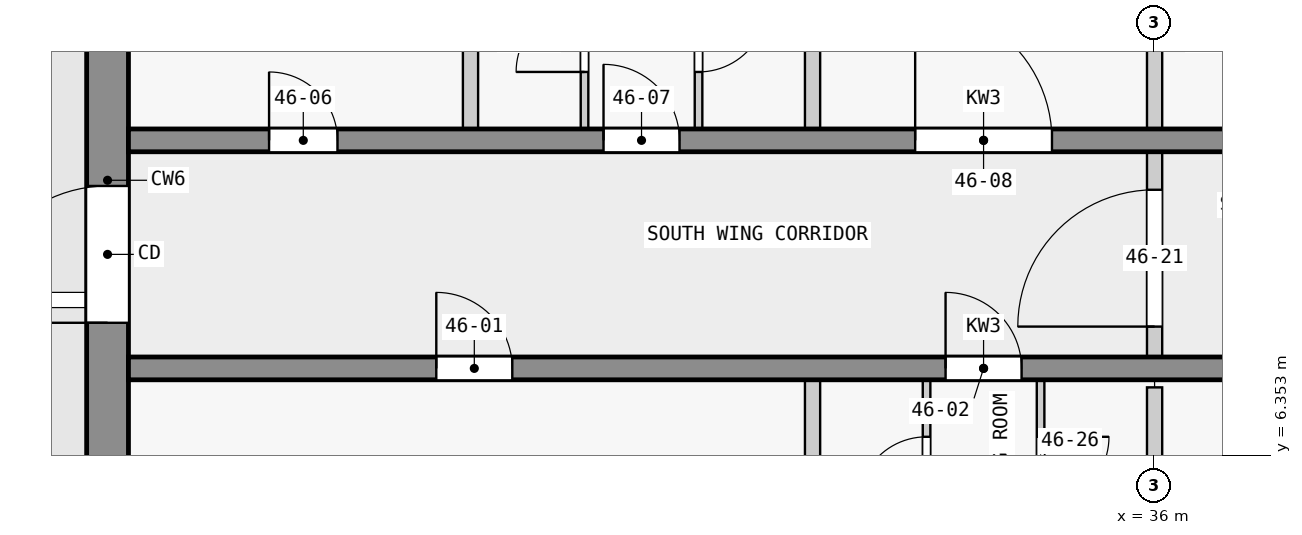
"""IFC4 building model, lengths in metres.
Left out: names, types, materials, properties, quantities, classifications, styles, units other than length and angle.
Written with IfcOpenShell. Run it as: python <this file> out.ifc"""

import sys

from ifc_helpers import new_model, si_unit, direction, frame, frame_2d, origin, place, context, subcontext, project, spatial, rectangle, extrude, element, fill, save


model = new_model("IFC4")
c1 = context("Model", 3, precision=1e-05, world=origin(), true_north=direction((0.0, 1.0)))
c2 = subcontext(c1, "Body", "Model", "MODEL_VIEW")
j1 = project(units=[si_unit("LENGTHUNIT", "METRE"), si_unit("PLANEANGLEUNIT", "RADIAN")], contexts=[c1])
p1 = place(None, origin())
s1 = spatial("IfcSite", under=j1, at=p1, CompositionType="ELEMENT")
p2 = place(p1, origin())
s2 = spatial("IfcBuilding", under=s1, at=p2, CompositionType="ELEMENT")
p3 = place(p2, frame((0.0, 0.0, 177.9)))
s3 = spatial("IfcBuildingStorey", under=s2, at=p3, CompositionType="ELEMENT", Elevation=177.9)
p4 = place(p3, frame((22.225, 2.5, 0.0), z_axis=(0.0, 0.0, 1.0), x_axis=(0.0, 1.0, 0.0)))
e1 = element("IfcWall", 1, at=p4, inside=s3, PredefinedType="SHEAR", context=c2, shape_type="SweptSolid", body=[
    extrude(rectangle(XDim=14.95, YDim=0.55, at=frame_2d((7.475, 0.0))), origin(), (0.0, 0.0, 1.0), 3.25),
])
p5 = place(p4, frame((5.6, 0.0, 0.0)))
e2 = element("IfcOpeningElement", 2, at=p5, cuts=e1, PredefinedType="OPENING", context=c2, shape_type="SweptSolid", body=[
    extrude(rectangle(XDim=1.8, YDim=2.1, at=frame_2d((0.9, 1.05))), frame((0.0, 0.285, 0.0), z_axis=(0.0, -1.0, 0.0), x_axis=(1.0, 0.0, 0.0)), (0.0, 0.0, 1.0), 0.57),
])
p6 = place(p3, frame((22.5, 7.5, 0.0), z_axis=(0.0, 0.0, 1.0), x_axis=(1.0, 0.0, 0.0)))
e3 = element("IfcWall", 3, at=p6, inside=s3, PredefinedType="SHEAR", context=c2, shape_type="SweptSolid", body=[
    extrude(rectangle(XDim=22.5, YDim=0.3, at=frame_2d((11.25, 0.0))), origin(), (0.0, 0.0, 1.0), 3.25),
])
p7 = place(p6, frame((4.05, 0.0, 0.0)))
e4 = element("IfcOpeningElement", 4, at=p7, cuts=e3, PredefinedType="OPENING", context=c2, shape_type="SweptSolid", body=[
    extrude(rectangle(XDim=1.0, YDim=2.1, at=frame_2d((0.5, 1.05))), frame((0.0, 0.16, 0.0), z_axis=(0.0, -1.0, 0.0), x_axis=(1.0, 0.0, 0.0)), (0.0, 0.0, 1.0), 0.32),
])
p8 = place(p6, frame((10.75, 0.0, 0.0)))
e5 = element("IfcOpeningElement", 5, at=p8, cuts=e3, PredefinedType="OPENING", context=c2, shape_type="SweptSolid", body=[
    extrude(rectangle(XDim=1.0, YDim=2.1, at=frame_2d((0.5, 1.05))), frame((0.0, 0.16, 0.0), z_axis=(0.0, -1.0, 0.0), x_axis=(1.0, 0.0, 0.0)), (0.0, 0.0, 1.0), 0.32),
])
p9 = place(p6, frame((15.35, 0.0, 0.0)))
e6 = element("IfcOpeningElement", 6, at=p9, cuts=e3, PredefinedType="OPENING", context=c2, shape_type="SweptSolid", body=[
    extrude(rectangle(XDim=0.9, YDim=2.1, at=frame_2d((0.45, 1.05))), frame((0.0, 0.16, 0.0), z_axis=(0.0, -1.0, 0.0), x_axis=(1.0, 0.0, 0.0)), (0.0, 0.0, 1.0), 0.32),
])
p10 = place(p6, frame((18.75, 0.0, 0.0)))
e7 = element("IfcOpeningElement", 7, at=p10, cuts=e3, PredefinedType="OPENING", context=c2, shape_type="SweptSolid", body=[
    extrude(rectangle(XDim=0.9, YDim=2.1, at=frame_2d((0.45, 1.05))), frame((0.0, 0.16, 0.0), z_axis=(0.0, -1.0, 0.0), x_axis=(1.0, 0.0, 0.0)), (0.0, 0.0, 1.0), 0.32),
])
p11 = place(p6, frame((20.95, 0.0, 0.0)))
e8 = element("IfcOpeningElement", 8, at=p11, cuts=e3, PredefinedType="OPENING", context=c2, shape_type="SweptSolid", body=[
    extrude(rectangle(XDim=1.0, YDim=2.1, at=frame_2d((0.5, 1.05))), frame((0.0, 0.16, 0.0), z_axis=(0.0, -1.0, 0.0), x_axis=(1.0, 0.0, 0.0)), (0.0, 0.0, 1.0), 0.32),
])
p12 = place(p3, frame((22.5, 10.5, 0.0), z_axis=(0.0, 0.0, 1.0), x_axis=(1.0, 0.0, 0.0)))
e9 = element("IfcWall", 9, at=p12, inside=s3, PredefinedType="SHEAR", context=c2, shape_type="SweptSolid", body=[
    extrude(rectangle(XDim=22.5, YDim=0.3, at=frame_2d((11.25, 0.0))), origin(), (0.0, 0.0, 1.0), 3.25),
])
p13 = place(p12, frame((1.85, 0.0, 0.0)))
e10 = element("IfcOpeningElement", 10, at=p13, cuts=e9, PredefinedType="OPENING", context=c2, shape_type="SweptSolid", body=[
    extrude(rectangle(XDim=0.9, YDim=2.1, at=frame_2d((0.45, 1.05))), frame((0.0, 0.16, 0.0), z_axis=(0.0, -1.0, 0.0), x_axis=(1.0, 0.0, 0.0)), (0.0, 0.0, 1.0), 0.32),
])
p14 = place(p12, frame((6.25, 0.0, 0.0)))
e11 = element("IfcOpeningElement", 11, at=p14, cuts=e9, PredefinedType="OPENING", context=c2, shape_type="SweptSolid", body=[
    extrude(rectangle(XDim=1.0, YDim=2.1, at=frame_2d((0.5, 1.05))), frame((0.0, 0.16, 0.0), z_axis=(0.0, -1.0, 0.0), x_axis=(1.0, 0.0, 0.0)), (0.0, 0.0, 1.0), 0.32),
])
p15 = place(p12, frame((10.35, 0.0, 0.0)))
e12 = element("IfcOpeningElement", 12, at=p15, cuts=e9, PredefinedType="OPENING", context=c2, shape_type="SweptSolid", body=[
    extrude(rectangle(XDim=1.8, YDim=2.1, at=frame_2d((0.9, 1.05))), frame((0.0, 0.16, 0.0), z_axis=(0.0, -1.0, 0.0), x_axis=(1.0, 0.0, 0.0)), (0.0, 0.0, 1.0), 0.32),
])
p16 = place(p12, frame((16.85, 0.0, 0.0)))
e13 = element("IfcOpeningElement", 13, at=p16, cuts=e9, PredefinedType="OPENING", context=c2, shape_type="SweptSolid", body=[
    extrude(rectangle(XDim=1.0, YDim=2.1, at=frame_2d((0.5, 1.05))), frame((0.0, 0.16, 0.0), z_axis=(0.0, -1.0, 0.0), x_axis=(1.0, 0.0, 0.0)), (0.0, 0.0, 1.0), 0.32),
])
p17 = place(p3, frame((27.0, 10.65, 0.0), z_axis=(0.0, 0.0, 1.0), x_axis=(0.0, 1.0, 0.0)))
e14 = element("IfcWall", 14, at=p17, inside=s3, PredefinedType="PARTITIONING", context=c2, shape_type="SweptSolid", body=[
    extrude(rectangle(XDim=5.823, YDim=0.2, at=frame_2d((2.912, 0.0))), origin(), (0.0, 0.0, 1.0), 3.25),
])
p18 = place(p3, frame((28.5, 10.65, 0.0), z_axis=(0.0, 0.0, 1.0), x_axis=(0.0, 1.0, 0.0)))
e15 = element("IfcWall", 15, at=p18, inside=s3, PredefinedType="PARTITIONING", context=c2, shape_type="SweptSolid", body=[
    extrude(rectangle(XDim=2.4, YDim=0.1, at=frame_2d((1.2, 0.0))), origin(), (0.0, 0.0, 1.0), 3.25),
])
p19 = place(p18, frame((0.75, 0.0, 0.0)))
e16 = element("IfcOpeningElement", 16, at=p19, cuts=e15, PredefinedType="OPENING", context=c2, shape_type="SweptSolid", body=[
    extrude(rectangle(XDim=0.9, YDim=2.1, at=frame_2d((0.45, 1.05))), frame((0.0, 0.06, 0.0), z_axis=(0.0, -1.0, 0.0), x_axis=(1.0, 0.0, 0.0)), (0.0, 0.0, 1.0), 0.12),
])
p20 = place(p3, frame((30.0, 13.05, 0.0), z_axis=(0.0, 0.0, 1.0), x_axis=(0.0, -1.0, 0.0)))
e17 = element("IfcWall", 17, at=p20, inside=s3, PredefinedType="PARTITIONING", context=c2, shape_type="SweptSolid", body=[
    extrude(rectangle(XDim=2.4, YDim=0.1, at=frame_2d((1.2, 0.0))), origin(), (0.0, 0.0, 1.0), 3.25),
])
p21 = place(p20, frame((0.75, 0.0, 0.0)))
e18 = element("IfcOpeningElement", 18, at=p21, cuts=e17, PredefinedType="OPENING", context=c2, shape_type="SweptSolid", body=[
    extrude(rectangle(XDim=0.9, YDim=2.1, at=frame_2d((0.45, 1.05))), frame((0.0, 0.06, 0.0), z_axis=(0.0, -1.0, 0.0), x_axis=(1.0, 0.0, 0.0)), (0.0, 0.0, 1.0), 0.12),
])
p22 = place(p3, frame((31.5, 1.122, 0.0), z_axis=(0.0, 0.0, 1.0), x_axis=(0.0, 1.0, 0.0)))
e19 = element("IfcWall", 19, at=p22, inside=s3, PredefinedType="PARTITIONING", context=c2, shape_type="SweptSolid", body=[
    extrude(rectangle(XDim=6.228, YDim=0.2, at=frame_2d((3.114, 0.0))), origin(), (0.0, 0.0, 1.0), 3.25),
])
p23 = place(p3, frame((31.5, 10.65, 0.0), z_axis=(0.0, 0.0, 1.0), x_axis=(0.0, 1.0, 0.0)))
e20 = element("IfcWall", 20, at=p23, inside=s3, PredefinedType="PARTITIONING", context=c2, shape_type="SweptSolid", body=[
    extrude(rectangle(XDim=2.3, YDim=0.2, at=frame_2d((1.15, 0.0))), origin(), (0.0, 0.0, 1.0), 3.25),
])
p24 = place(p3, frame((33.0, 4.95, 0.0), z_axis=(0.0, 0.0, 1.0), x_axis=(0.0, 1.0, 0.0)))
e21 = element("IfcWall", 21, at=p24, inside=s3, PredefinedType="PARTITIONING", context=c2, shape_type="SweptSolid", body=[
    extrude(rectangle(XDim=2.4, YDim=0.1, at=frame_2d((1.2, 0.0))), origin(), (0.0, 0.0, 1.0), 3.25),
])
p25 = place(p24, frame((0.75, 0.0, 0.0)))
e22 = element("IfcOpeningElement", 22, at=p25, cuts=e21, PredefinedType="OPENING", context=c2, shape_type="SweptSolid", body=[
    extrude(rectangle(XDim=0.9, YDim=2.1, at=frame_2d((0.45, 1.05))), frame((0.0, 0.06, 0.0), z_axis=(0.0, -1.0, 0.0), x_axis=(1.0, 0.0, 0.0)), (0.0, 0.0, 1.0), 0.12),
])
p26 = place(p3, frame((34.5, 7.35, 0.0), z_axis=(0.0, 0.0, 1.0), x_axis=(0.0, -1.0, 0.0)))
e23 = element("IfcWall", 23, at=p26, inside=s3, PredefinedType="PARTITIONING", context=c2, shape_type="SweptSolid", body=[
    extrude(rectangle(XDim=2.4, YDim=0.1, at=frame_2d((1.2, 0.0))), origin(), (0.0, 0.0, 1.0), 3.25),
])
p27 = place(p26, frame((0.75, 0.0, 0.0)))
e24 = element("IfcOpeningElement", 24, at=p27, cuts=e23, PredefinedType="OPENING", context=c2, shape_type="SweptSolid", body=[
    extrude(rectangle(XDim=0.9, YDim=2.1, at=frame_2d((0.45, 1.05))), frame((0.0, 0.06, 0.0), z_axis=(0.0, -1.0, 0.0), x_axis=(1.0, 0.0, 0.0)), (0.0, 0.0, 1.0), 0.12),
])
p28 = place(p3, frame((36.0, 5.05, 0.0), z_axis=(0.0, 0.0, 1.0), x_axis=(0.0, 1.0, 0.0)))
e25 = element("IfcWall", 25, at=p28, inside=s3, PredefinedType="PARTITIONING", context=c2, shape_type="SweptSolid", body=[
    extrude(rectangle(XDim=2.2, YDim=0.2, at=frame_2d((1.1, 0.0))), origin(), (0.0, 0.0, 1.0), 3.25),
])
p29 = place(p3, frame((36.0, 10.65, 0.0), z_axis=(0.0, 0.0, 1.0), x_axis=(0.0, 1.0, 0.0)))
e26 = element("IfcWall", 26, at=p29, inside=s3, PredefinedType="PARTITIONING", context=c2, shape_type="SweptSolid", body=[
    extrude(rectangle(XDim=5.95, YDim=0.2, at=frame_2d((2.975, 0.0))), origin(), (0.0, 0.0, 1.0), 3.25),
])
p30 = place(p3, frame((36.0, 7.35, 0.0), z_axis=(0.0, 0.0, 1.0), x_axis=(0.0, 1.0, 0.0)))
e27 = element("IfcWall", 27, at=p30, inside=s3, PredefinedType="PARTITIONING", context=c2, shape_type="SweptSolid", body=[
    extrude(rectangle(XDim=3.2, YDim=0.2, at=frame_2d((1.6, 0.0))), origin(), (0.0, 0.0, 1.0), 3.25),
])
p31 = place(p30, frame((0.7, 0.0, 0.0)))
e28 = element("IfcOpeningElement", 28, at=p31, cuts=e27, PredefinedType="OPENING", context=c2, shape_type="SweptSolid", body=[
    extrude(rectangle(XDim=1.8, YDim=2.1, at=frame_2d((0.9, 1.05))), frame((0.0, 0.11, 0.0), z_axis=(0.0, -1.0, 0.0), x_axis=(1.0, 0.0, 0.0)), (0.0, 0.0, 1.0), 0.22),
])
p32 = place(p5, origin())
e29 = element("IfcDoor", 29, at=p32, inside=s3, OperationType="DOUBLE_DOOR_SINGLE_SWING", PredefinedType="DOOR", context=c2, shape_type="SweptSolid", body=[
    extrude(rectangle(XDim=1.8, YDim=2.1, at=frame_2d((0.9, 1.05))), frame((0.0, 0.025, 0.0), z_axis=(0.0, -1.0, 0.0), x_axis=(1.0, 0.0, 0.0)), (0.0, 0.0, 1.0), 0.05),
])
fill(e2, e29)
p33 = place(p7, origin())
e30 = element("IfcDoor", 30, at=p33, inside=s3, OperationType="SINGLE_SWING_LEFT", PredefinedType="DOOR", context=c2, shape_type="SweptSolid", body=[
    extrude(rectangle(XDim=1.0, YDim=2.1, at=frame_2d((0.5, 1.05))), frame((0.0, 0.025, 0.0), z_axis=(0.0, -1.0, 0.0), x_axis=(1.0, 0.0, 0.0)), (0.0, 0.0, 1.0), 0.05),
])
fill(e4, e30)
p34 = place(p8, origin())
e31 = element("IfcDoor", 31, at=p34, inside=s3, OperationType="SINGLE_SWING_LEFT", PredefinedType="DOOR", context=c2, shape_type="SweptSolid", body=[
    extrude(rectangle(XDim=1.0, YDim=2.1, at=frame_2d((0.5, 1.05))), frame((0.0, 0.025, 0.0), z_axis=(0.0, -1.0, 0.0), x_axis=(1.0, 0.0, 0.0)), (0.0, 0.0, 1.0), 0.05),
])
fill(e5, e31)
p35 = place(p13, origin())
e32 = element("IfcDoor", 32, at=p35, inside=s3, OperationType="SINGLE_SWING_LEFT", PredefinedType="DOOR", context=c2, shape_type="SweptSolid", body=[
    extrude(rectangle(XDim=0.9, YDim=2.1, at=frame_2d((0.45, 1.05))), frame((0.0, 0.025, 0.0), z_axis=(0.0, -1.0, 0.0), x_axis=(1.0, 0.0, 0.0)), (0.0, 0.0, 1.0), 0.05),
])
fill(e10, e32)
p36 = place(p14, origin())
e33 = element("IfcDoor", 33, at=p36, inside=s3, OperationType="SINGLE_SWING_LEFT", PredefinedType="DOOR", context=c2, shape_type="SweptSolid", body=[
    extrude(rectangle(XDim=1.0, YDim=2.1, at=frame_2d((0.5, 1.05))), frame((0.0, 0.025, 0.0), z_axis=(0.0, -1.0, 0.0), x_axis=(1.0, 0.0, 0.0)), (0.0, 0.0, 1.0), 0.05),
])
fill(e11, e33)
p37 = place(p15, origin())
e34 = element("IfcDoor", 34, at=p37, inside=s3, OperationType="SINGLE_SWING_LEFT", PredefinedType="DOOR", context=c2, shape_type="SweptSolid", body=[
    extrude(rectangle(XDim=1.8, YDim=2.1, at=frame_2d((0.9, 1.05))), frame((0.0, 0.025, 0.0), z_axis=(0.0, -1.0, 0.0), x_axis=(1.0, 0.0, 0.0)), (0.0, 0.0, 1.0), 0.05),
])
fill(e12, e34)
p38 = place(p31, origin())
e35 = element("IfcDoor", 35, at=p38, inside=s3, OperationType="SINGLE_SWING_LEFT", PredefinedType="DOOR", context=c2, shape_type="SweptSolid", body=[
    extrude(rectangle(XDim=1.8, YDim=2.1, at=frame_2d((0.9, 1.05))), frame((0.0, 0.025, 0.0), z_axis=(0.0, -1.0, 0.0), x_axis=(1.0, 0.0, 0.0)), (0.0, 0.0, 1.0), 0.05),
])
fill(e28, e35)
p39 = place(p25, origin())
e36 = element("IfcDoor", 36, at=p39, inside=s3, OperationType="SINGLE_SWING_RIGHT", PredefinedType="DOOR", context=c2, shape_type="SweptSolid", body=[
    extrude(rectangle(XDim=0.9, YDim=2.1, at=frame_2d((0.45, 1.05))), frame((0.0, 0.025, 0.0), z_axis=(0.0, -1.0, 0.0), x_axis=(1.0, 0.0, 0.0)), (0.0, 0.0, 1.0), 0.05),
])
fill(e22, e36)
p40 = place(p27, origin())
e37 = element("IfcDoor", 37, at=p40, inside=s3, OperationType="SINGLE_SWING_RIGHT", PredefinedType="DOOR", context=c2, shape_type="SweptSolid", body=[
    extrude(rectangle(XDim=0.9, YDim=2.1, at=frame_2d((0.45, 1.05))), frame((0.0, 0.025, 0.0), z_axis=(0.0, -1.0, 0.0), x_axis=(1.0, 0.0, 0.0)), (0.0, 0.0, 1.0), 0.05),
])
fill(e24, e37)
p41 = place(p19, origin())
e38 = element("IfcDoor", 38, at=p41, inside=s3, OperationType="SINGLE_SWING_LEFT", PredefinedType="DOOR", context=c2, shape_type="SweptSolid", body=[
    extrude(rectangle(XDim=0.9, YDim=2.1, at=frame_2d((0.45, 1.05))), frame((0.0, 0.025, 0.0), z_axis=(0.0, -1.0, 0.0), x_axis=(1.0, 0.0, 0.0)), (0.0, 0.0, 1.0), 0.05),
])
fill(e16, e38)
p42 = place(p21, origin())
e39 = element("IfcDoor", 39, at=p42, inside=s3, OperationType="SINGLE_SWING_LEFT", PredefinedType="DOOR", context=c2, shape_type="SweptSolid", body=[
    extrude(rectangle(XDim=0.9, YDim=2.1, at=frame_2d((0.45, 1.05))), frame((0.0, 0.025, 0.0), z_axis=(0.0, -1.0, 0.0), x_axis=(1.0, 0.0, 0.0)), (0.0, 0.0, 1.0), 0.05),
])
fill(e18, e39)
save(model, sys.argv[1])
